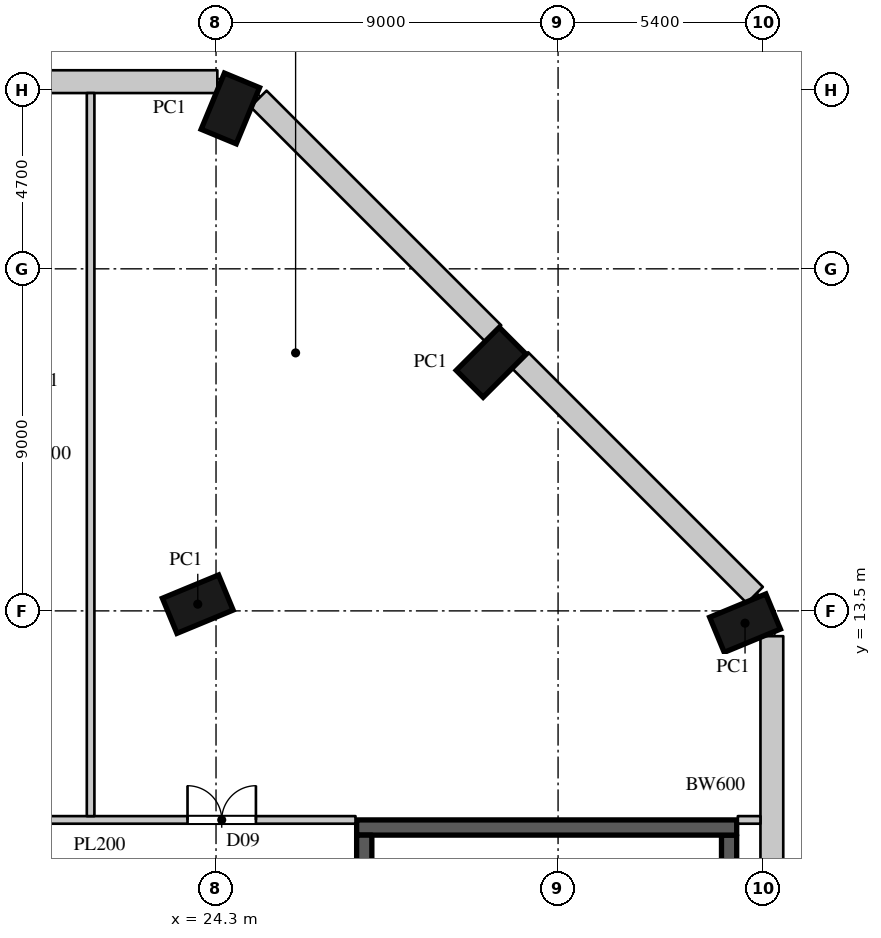
"""IFC4 building model, lengths in metres.
Left out: names, types, materials, properties, quantities, classifications, styles, units other than length and angle.
Written with IfcOpenShell. Run it as: python <this file> out.ifc"""

import sys

from ifc_helpers import new_model, si_unit, direction, frame, frame_2d, origin, origin_2d, place, context, subcontext, project, spatial, rectangle, extrude, element, fill, save


model = new_model("IFC4")
c1 = context("Model", 3, precision=1e-05, world=origin(), true_north=direction((0.0, 1.0)))
c2 = subcontext(c1, "Body", "Model", "MODEL_VIEW")
j1 = project(units=[si_unit("LENGTHUNIT", "METRE"), si_unit("PLANEANGLEUNIT", "RADIAN")], contexts=[c1])
p1 = place(None, origin())
s1 = spatial("IfcSite", under=j1, at=p1, CompositionType="ELEMENT")
p2 = place(p1, origin())
s2 = spatial("IfcBuilding", under=s1, at=p2, CompositionType="ELEMENT")
p3 = place(p2, frame((0.0, 0.0, 29.0)))
s3 = spatial("IfcBuildingStorey", under=s2, at=p3, CompositionType="ELEMENT", Elevation=29.0)
for number, where, z_axis, x_axis in (
    (1, (23.82, 13.677, 0.0), (0.0, 0.0, 1.0), (-0.383, 0.924, 0.0)),
    (2, (38.219, 13.177, 0.0), (0.0, 0.0, 1.0), (-0.383, 0.924, 0.0)),
    (3, (31.54, 20.04, 0.0), (0.0, 0.0, 1.0), (-0.707, 0.707, 0.0)),
    (4, (24.677, 26.719, 0.0), (0.0, 0.0, 1.0), (-0.924, 0.383, 0.0)),
):
    element("IfcColumn", number, at=place(p3, frame(where, z_axis=z_axis, x_axis=x_axis)), inside=s3, PredefinedType="COLUMN", context=c2, shape_type="SweptSolid", body=[
        extrude(rectangle(XDim=1.0, YDim=1.6, at=origin_2d()), origin(), (0.0, 0.0, 1.0), 7.0),
    ])
p4 = place(p3, frame((38.925, 5.0, 0.0), z_axis=(0.0, 0.0, 1.0), x_axis=(0.0, 1.0, 0.0)))
e5 = element("IfcWall", 5, at=p4, inside=s3, PredefinedType="ELEMENTEDWALL", context=c2, shape_type="SweptSolid", body=[
    extrude(rectangle(XDim=7.834, YDim=0.6, at=frame_2d((3.917, 0.0))), origin(), (0.0, 0.0, 1.0), 6.6),
])
for number, where, z_axis, x_axis in (
    (6, (38.476, 13.917, 0.0), (0.0, 0.0, 1.0), (-0.707, 0.707, 0.0)),
    (7, (31.594, 20.801, 0.0), (0.0, 0.0, 1.0), (-0.707, 0.707, 0.0)),
):
    element("IfcWall", number, at=place(p3, frame(where, z_axis=z_axis, x_axis=x_axis)), inside=s3, PredefinedType="ELEMENTEDWALL", context=c2, shape_type="SweptSolid", body=[
        extrude(rectangle(XDim=8.734, YDim=0.6, at=frame_2d((4.367, 0.0))), origin(), (0.0, 0.0, 1.0), 6.6),
    ])
p5 = place(p3, frame((24.334, 27.425, 0.0), z_axis=(0.0, 0.0, 1.0), x_axis=(-1.0, 0.0, 0.0)))
e8 = element("IfcWall", 8, at=p5, inside=s3, PredefinedType="ELEMENTEDWALL", context=c2, shape_type="SweptSolid", body=[
    extrude(rectangle(XDim=53.534, YDim=0.6, at=frame_2d((26.767, 0.0))), origin(), (0.0, 0.0, 1.0), 6.6),
])
p6 = place(p3, frame((28.0, 7.8, 0.0), z_axis=(0.0, 0.0, 1.0), x_axis=(1.0, 0.0, 0.0)))
e9 = element("IfcWall", 9, at=p6, inside=s3, PredefinedType="SHEAR", context=c2, shape_type="SweptSolid", body=[
    extrude(rectangle(XDim=10.0, YDim=0.4, at=frame_2d((5.0, 0.0))), origin(), (0.0, 0.0, 1.0), 7.0),
])
p7 = place(p3, frame((37.8, -7.6, 0.0), z_axis=(0.0, 0.0, 1.0), x_axis=(0.0, 1.0, 0.0)))
e10 = element("IfcWall", 10, at=p7, inside=s3, PredefinedType="SHEAR", context=c2, shape_type="SweptSolid", body=[
    extrude(rectangle(XDim=15.2, YDim=0.4, at=frame_2d((7.6, 0.0))), origin(), (0.0, 0.0, 1.0), 7.0),
])
p8 = place(p3, frame((28.2, -7.6, 0.0), z_axis=(0.0, 0.0, 1.0), x_axis=(0.0, 1.0, 0.0)))
e11 = element("IfcWall", 11, at=p8, inside=s3, PredefinedType="SHEAR", context=c2, shape_type="SweptSolid", body=[
    extrude(rectangle(XDim=15.2, YDim=0.4, at=frame_2d((7.6, 0.0))), origin(), (0.0, 0.0, 1.0), 7.0),
])
p9 = place(p8, frame((4.05, 0.0, 0.0)))
e12 = element("IfcOpeningElement", 12, at=p9, cuts=e11, PredefinedType="OPENING", context=c2, shape_type="SweptSolid", body=[
    extrude(rectangle(XDim=1.5, YDim=2.4, at=frame_2d((0.75, 1.2))), frame((0.0, 0.21, 0.0), z_axis=(0.0, -1.0, 0.0), x_axis=(1.0, 0.0, 0.0)), (0.0, 0.0, 1.0), 0.42),
])
p10 = place(p8, frame((6.95, 0.0, 0.0)))
e13 = element("IfcOpeningElement", 13, at=p10, cuts=e11, PredefinedType="OPENING", context=c2, shape_type="SweptSolid", body=[
    extrude(rectangle(XDim=1.5, YDim=2.4, at=frame_2d((0.75, 1.2))), frame((0.0, 0.21, 0.0), z_axis=(0.0, -1.0, 0.0), x_axis=(1.0, 0.0, 0.0)), (0.0, 0.0, 1.0), 0.42),
])
p11 = place(p3, frame((14.5, 8.0, 0.0), z_axis=(0.0, 0.0, 1.0), x_axis=(1.0, 0.0, 0.0)))
e14 = element("IfcWall", 14, at=p11, inside=s3, PredefinedType="PARTITIONING", context=c2, shape_type="SweptSolid", body=[
    extrude(rectangle(XDim=13.47, YDim=0.2, at=frame_2d((6.735, 0.0))), origin(), (0.0, 0.0, 1.0), 6.598),
])
p12 = place(p11, frame((2.4, 0.0, 0.0)))
e15 = element("IfcOpeningElement", 15, at=p12, cuts=e14, PredefinedType="OPENING", context=c2, shape_type="SweptSolid", body=[
    extrude(rectangle(XDim=1.8, YDim=2.4, at=frame_2d((0.9, 1.2))), frame((0.0, 0.11, 0.0), z_axis=(0.0, -1.0, 0.0), x_axis=(1.0, 0.0, 0.0)), (0.0, 0.0, 1.0), 0.22),
])
p13 = place(p11, frame((9.05, 0.0, 0.0)))
e16 = element("IfcOpeningElement", 16, at=p13, cuts=e14, PredefinedType="OPENING", context=c2, shape_type="SweptSolid", body=[
    extrude(rectangle(XDim=1.8, YDim=2.4, at=frame_2d((0.9, 1.2))), frame((0.0, 0.11, 0.0), z_axis=(0.0, -1.0, 0.0), x_axis=(1.0, 0.0, 0.0)), (0.0, 0.0, 1.0), 0.22),
])
p14 = place(p3, frame((21.0, 8.1, 0.0), z_axis=(0.0, 0.0, 1.0), x_axis=(0.0, 1.0, 0.0)))
e17 = element("IfcWall", 17, at=p14, inside=s3, PredefinedType="PARTITIONING", context=c2, shape_type="SweptSolid", body=[
    extrude(rectangle(XDim=19.025, YDim=0.2, at=frame_2d((9.512, 0.0))), origin(), (0.0, 0.0, 1.0), 6.598),
])
p15 = place(p3, frame((38.03, 8.0, 0.0), z_axis=(0.0, 0.0, 1.0), x_axis=(1.0, 0.0, 0.0)))
e18 = element("IfcWall", 18, at=p15, inside=s3, PredefinedType="PARTITIONING", context=c2, shape_type="SweptSolid", body=[
    extrude(rectangle(XDim=0.595, YDim=0.2, at=frame_2d((0.297, 0.0))), origin(), (0.0, 0.0, 1.0), 6.598),
])
p16 = place(p13, origin())
e19 = element("IfcDoor", 19, at=p16, inside=s3, OperationType="DOUBLE_DOOR_SINGLE_SWING", PredefinedType="DOOR", context=c2, shape_type="SweptSolid", body=[
    extrude(rectangle(XDim=1.8, YDim=2.4, at=frame_2d((0.9, 1.2))), frame((0.0, 0.025, 0.0), z_axis=(0.0, -1.0, 0.0), x_axis=(1.0, 0.0, 0.0)), (0.0, 0.0, 1.0), 0.05),
])
fill(e16, e19)
save(model, sys.argv[1])
